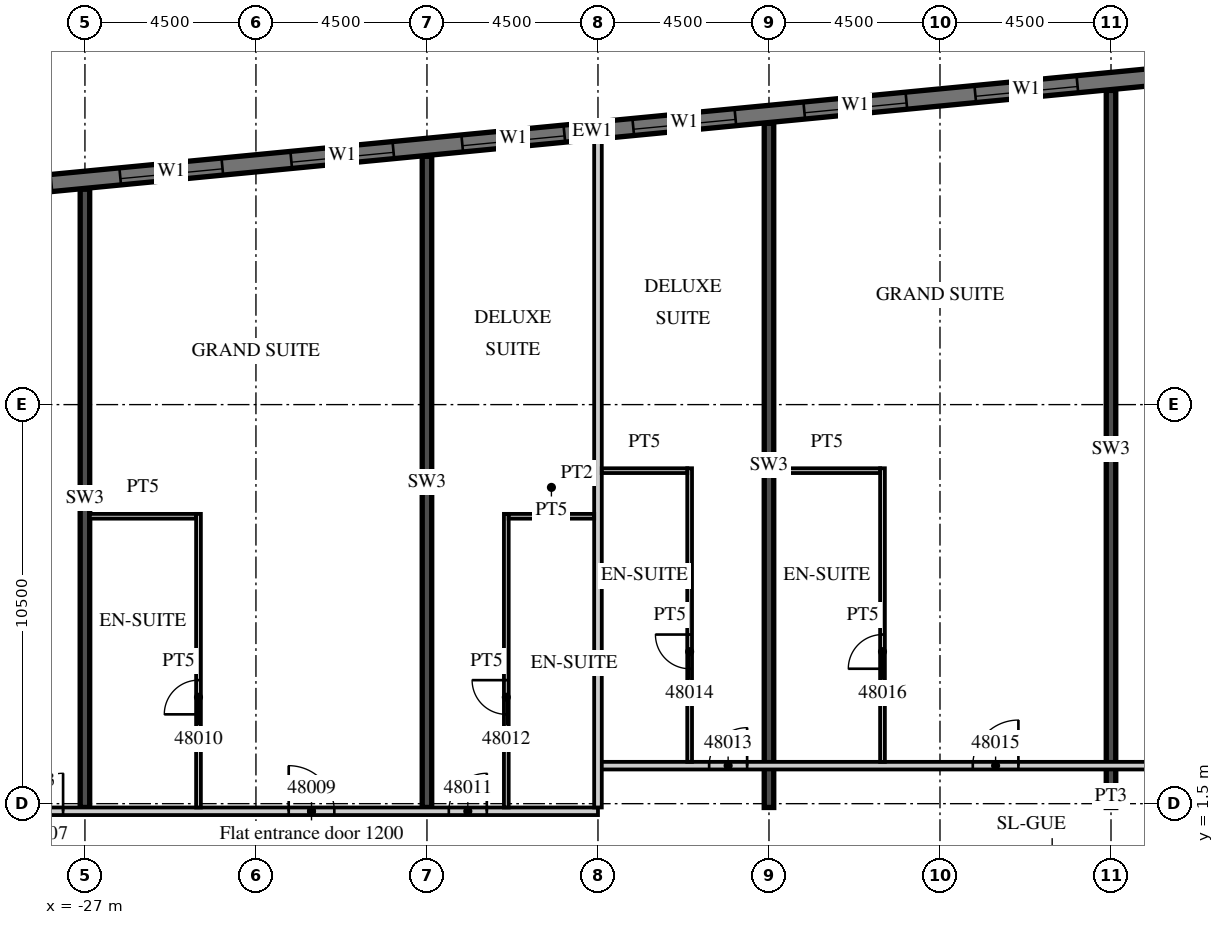
"""IFC4 building model, lengths in metres.
Left out: names, types, materials, properties, quantities, classifications, styles, units other than length and angle.
Written with IfcOpenShell. Run it as: python <this file> out.ifc"""

import sys

from ifc_helpers import new_model, si_unit, direction, frame, frame_2d, origin, place, context, subcontext, project, spatial, rectangle, extrude, element, fill, save


model = new_model("IFC4")
c1 = context("Model", 3, precision=1e-05, world=origin(), true_north=direction((0.0, 1.0)))
c2 = subcontext(c1, "Body", "Model", "MODEL_VIEW")
j1 = project(units=[si_unit("LENGTHUNIT", "METRE"), si_unit("PLANEANGLEUNIT", "RADIAN")], contexts=[c1])
p1 = place(None, origin())
s1 = spatial("IfcSite", under=j1, at=p1, CompositionType="ELEMENT")
p2 = place(p1, origin())
s2 = spatial("IfcBuilding", under=s1, at=p2, CompositionType="ELEMENT")
p3 = place(p2, frame((0.0, 0.0, 199.9)))
s3 = spatial("IfcBuildingStorey", under=s2, at=p3, CompositionType="ELEMENT", Elevation=199.9)
p4 = place(p3, frame((-27.0, 1.4, 0.0), z_axis=(0.0, 0.0, 1.0), x_axis=(0.0, 1.0, 0.0)))
e1 = element("IfcWall", 1, at=p4, inside=s3, PredefinedType="SHEAR", context=c2, shape_type="SweptSolid", body=[
    extrude(rectangle(XDim=16.268, YDim=0.25, at=frame_2d((8.134, 0.0))), origin(), (0.0, 0.0, 1.0), 3.3),
])
p5 = place(p3, frame((-18.0, 1.4, 0.0), z_axis=(0.0, 0.0, 1.0), x_axis=(0.0, 1.0, 0.0)))
e2 = element("IfcWall", 2, at=p5, inside=s3, PredefinedType="SHEAR", context=c2, shape_type="SweptSolid", body=[
    extrude(rectangle(XDim=17.134, YDim=0.25, at=frame_2d((8.567, 0.0))), origin(), (0.0, 0.0, 1.0), 3.3),
])
p6 = place(p3, frame((-9.0, 1.4, 0.0), z_axis=(0.0, 0.0, 1.0), x_axis=(0.0, 1.0, 0.0)))
e3 = element("IfcWall", 3, at=p6, inside=s3, PredefinedType="SHEAR", context=c2, shape_type="SweptSolid", body=[
    extrude(rectangle(XDim=18.001, YDim=0.25, at=frame_2d((9.0, 0.0))), origin(), (0.0, 0.0, 1.0), 3.3),
])
p7 = place(p3, frame((0.0, 1.4, 0.0), z_axis=(0.0, 0.0, 1.0), x_axis=(0.0, 1.0, 0.0)))
e4 = element("IfcWall", 4, at=p7, inside=s3, PredefinedType="SHEAR", context=c2, shape_type="SweptSolid", body=[
    extrude(rectangle(XDim=18.867, YDim=0.25, at=frame_2d((9.434, 0.0))), origin(), (0.0, 0.0, 1.0), 3.3),
])
p8 = place(p3, frame((13.521, 21.817, 0.0), z_axis=(0.0, 0.0, 1.0), x_axis=(-0.995396508751, -0.095842529008, 0.0)))
e5 = element("IfcWall", 5, at=p8, inside=s3, PredefinedType="SOLIDWALL", context=c2, shape_type="SweptSolid", body=[
    extrude(rectangle(XDim=54.591, YDim=0.45, at=frame_2d((27.296, 0.0))), origin(), (0.0, 0.0, 1.0), 3.02),
])
p9 = place(p8, frame((0.91, 0.0, 0.45)))
e6 = element("IfcOpeningElement", 6, at=p9, cuts=e5, PredefinedType="OPENING", context=c2, shape_type="SweptSolid", body=[
    extrude(rectangle(XDim=2.7, YDim=2.25, at=frame_2d((1.35, 1.125))), frame((0.0, 0.235, 0.0), z_axis=(0.0, -1.0, 0.0), x_axis=(1.0, 0.0, 0.0)), (0.0, 0.0, 1.0), 0.47),
])
p10 = place(p8, frame((5.431, 0.0, 0.45)))
e7 = element("IfcOpeningElement", 7, at=p10, cuts=e5, PredefinedType="OPENING", context=c2, shape_type="SweptSolid", body=[
    extrude(rectangle(XDim=2.7, YDim=2.25, at=frame_2d((1.35, 1.125))), frame((0.0, 0.235, 0.0), z_axis=(0.0, -1.0, 0.0), x_axis=(1.0, 0.0, 0.0)), (0.0, 0.0, 1.0), 0.47),
])
p11 = place(p8, frame((9.952, 0.0, 0.45)))
e8 = element("IfcOpeningElement", 8, at=p11, cuts=e5, PredefinedType="OPENING", context=c2, shape_type="SweptSolid", body=[
    extrude(rectangle(XDim=2.7, YDim=2.25, at=frame_2d((1.35, 1.125))), frame((0.0, 0.235, 0.0), z_axis=(0.0, -1.0, 0.0), x_axis=(1.0, 0.0, 0.0)), (0.0, 0.0, 1.0), 0.47),
])
p12 = place(p8, frame((14.473, 0.0, 0.45)))
e9 = element("IfcOpeningElement", 9, at=p12, cuts=e5, PredefinedType="OPENING", context=c2, shape_type="SweptSolid", body=[
    extrude(rectangle(XDim=2.7, YDim=2.25, at=frame_2d((1.35, 1.125))), frame((0.0, 0.235, 0.0), z_axis=(0.0, -1.0, 0.0), x_axis=(1.0, 0.0, 0.0)), (0.0, 0.0, 1.0), 0.47),
])
p13 = place(p8, frame((18.994, 0.0, 0.45)))
e10 = element("IfcOpeningElement", 10, at=p13, cuts=e5, PredefinedType="OPENING", context=c2, shape_type="SweptSolid", body=[
    extrude(rectangle(XDim=2.7, YDim=2.25, at=frame_2d((1.35, 1.125))), frame((0.0, 0.235, 0.0), z_axis=(0.0, -1.0, 0.0), x_axis=(1.0, 0.0, 0.0)), (0.0, 0.0, 1.0), 0.47),
])
p14 = place(p8, frame((23.514, 0.0, 0.45)))
e11 = element("IfcOpeningElement", 11, at=p14, cuts=e5, PredefinedType="OPENING", context=c2, shape_type="SweptSolid", body=[
    extrude(rectangle(XDim=2.7, YDim=2.25, at=frame_2d((1.35, 1.125))), frame((0.0, 0.235, 0.0), z_axis=(0.0, -1.0, 0.0), x_axis=(1.0, 0.0, 0.0)), (0.0, 0.0, 1.0), 0.47),
])
p15 = place(p8, frame((28.035, 0.0, 0.45)))
e12 = element("IfcOpeningElement", 12, at=p15, cuts=e5, PredefinedType="OPENING", context=c2, shape_type="SweptSolid", body=[
    extrude(rectangle(XDim=2.7, YDim=2.25, at=frame_2d((1.35, 1.125))), frame((0.0, 0.235, 0.0), z_axis=(0.0, -1.0, 0.0), x_axis=(1.0, 0.0, 0.0)), (0.0, 0.0, 1.0), 0.47),
])
p16 = place(p8, frame((32.556, 0.0, 0.45)))
e13 = element("IfcOpeningElement", 13, at=p16, cuts=e5, PredefinedType="OPENING", context=c2, shape_type="SweptSolid", body=[
    extrude(rectangle(XDim=2.7, YDim=2.25, at=frame_2d((1.35, 1.125))), frame((0.0, 0.235, 0.0), z_axis=(0.0, -1.0, 0.0), x_axis=(1.0, 0.0, 0.0)), (0.0, 0.0, 1.0), 0.47),
])
p17 = place(p8, frame((37.077, 0.0, 0.45)))
e14 = element("IfcOpeningElement", 14, at=p17, cuts=e5, PredefinedType="OPENING", context=c2, shape_type="SweptSolid", body=[
    extrude(rectangle(XDim=2.7, YDim=2.25, at=frame_2d((1.35, 1.125))), frame((0.0, 0.235, 0.0), z_axis=(0.0, -1.0, 0.0), x_axis=(1.0, 0.0, 0.0)), (0.0, 0.0, 1.0), 0.47),
])
p18 = place(p8, frame((41.598, 0.0, 0.45)))
e15 = element("IfcOpeningElement", 15, at=p18, cuts=e5, PredefinedType="OPENING", context=c2, shape_type="SweptSolid", body=[
    extrude(rectangle(XDim=2.7, YDim=2.25, at=frame_2d((1.35, 1.125))), frame((0.0, 0.235, 0.0), z_axis=(0.0, -1.0, 0.0), x_axis=(1.0, 0.0, 0.0)), (0.0, 0.0, 1.0), 0.47),
])
p19 = place(p8, frame((46.118, 0.0, 0.45)))
e16 = element("IfcOpeningElement", 16, at=p19, cuts=e5, PredefinedType="OPENING", context=c2, shape_type="SweptSolid", body=[
    extrude(rectangle(XDim=2.7, YDim=2.25, at=frame_2d((1.35, 1.125))), frame((0.0, 0.235, 0.0), z_axis=(0.0, -1.0, 0.0), x_axis=(1.0, 0.0, 0.0)), (0.0, 0.0, 1.0), 0.47),
])
p20 = place(p8, frame((50.629, 0.0, 0.45)))
e17 = element("IfcOpeningElement", 17, at=p20, cuts=e5, PredefinedType="OPENING", context=c2, shape_type="SweptSolid", body=[
    extrude(rectangle(XDim=2.7, YDim=2.25, at=frame_2d((1.35, 1.125))), frame((0.0, 0.235, 0.0), z_axis=(0.0, -1.0, 0.0), x_axis=(1.0, 0.0, 0.0)), (0.0, 0.0, 1.0), 0.47),
])
p21 = place(p3, frame((-42.913, 1.3, 0.0), z_axis=(0.0, 0.0, 1.0), x_axis=(1.0, 0.0, 0.0)))
e18 = element("IfcWall", 18, at=p21, inside=s3, PredefinedType="PARTITIONING", context=c2, shape_type="SweptSolid", body=[
    extrude(rectangle(XDim=29.413, YDim=0.2, at=frame_2d((14.707, 0.0))), origin(), (0.0, 0.0, 1.0), 3.02),
])
p22 = place(p21, frame((0.15, 0.0, 0.0)))
e19 = element("IfcOpeningElement", 19, at=p22, cuts=e18, PredefinedType="OPENING", context=c2, shape_type="SweptSolid", body=[
    extrude(rectangle(XDim=0.9, YDim=2.1, at=frame_2d((0.45, 1.05))), frame((0.0, 0.11, 0.0), z_axis=(0.0, -1.0, 0.0), x_axis=(1.0, 0.0, 0.0)), (0.0, 0.0, 1.0), 0.22),
])
p23 = place(p21, frame((2.963, 0.0, 0.0)))
e20 = element("IfcOpeningElement", 20, at=p23, cuts=e18, PredefinedType="OPENING", context=c2, shape_type="SweptSolid", body=[
    extrude(rectangle(XDim=1.0, YDim=2.1, at=frame_2d((0.5, 1.05))), frame((0.0, 0.11, 0.0), z_axis=(0.0, -1.0, 0.0), x_axis=(1.0, 0.0, 0.0)), (0.0, 0.0, 1.0), 0.22),
])
p24 = place(p21, frame((9.863, 0.0, 0.0)))
e21 = element("IfcOpeningElement", 21, at=p24, cuts=e18, PredefinedType="OPENING", context=c2, shape_type="SweptSolid", body=[
    extrude(rectangle(XDim=1.0, YDim=2.1, at=frame_2d((0.5, 1.05))), frame((0.0, 0.11, 0.0), z_axis=(0.0, -1.0, 0.0), x_axis=(1.0, 0.0, 0.0)), (0.0, 0.0, 1.0), 0.22),
])
p25 = place(p21, frame((14.338, 0.0, 0.0)))
e22 = element("IfcOpeningElement", 22, at=p25, cuts=e18, PredefinedType="OPENING", context=c2, shape_type="SweptSolid", body=[
    extrude(rectangle(XDim=1.0, YDim=2.1, at=frame_2d((0.5, 1.05))), frame((0.0, 0.11, 0.0), z_axis=(0.0, -1.0, 0.0), x_axis=(1.0, 0.0, 0.0)), (0.0, 0.0, 1.0), 0.22),
])
p26 = place(p21, frame((21.275, 0.0, 0.0)))
e23 = element("IfcOpeningElement", 23, at=p26, cuts=e18, PredefinedType="OPENING", context=c2, shape_type="SweptSolid", body=[
    extrude(rectangle(XDim=1.2, YDim=2.1, at=frame_2d((0.6, 1.05))), frame((0.0, 0.11, 0.0), z_axis=(0.0, -1.0, 0.0), x_axis=(1.0, 0.0, 0.0)), (0.0, 0.0, 1.0), 0.22),
])
p27 = place(p21, frame((25.488, 0.0, 0.0)))
e24 = element("IfcOpeningElement", 24, at=p27, cuts=e18, PredefinedType="OPENING", context=c2, shape_type="SweptSolid", body=[
    extrude(rectangle(XDim=1.0, YDim=2.1, at=frame_2d((0.5, 1.05))), frame((0.0, 0.11, 0.0), z_axis=(0.0, -1.0, 0.0), x_axis=(1.0, 0.0, 0.0)), (0.0, 0.0, 1.0), 0.22),
])
p28 = place(p3, frame((-13.5, 2.5, 0.0), z_axis=(0.0, 0.0, 1.0), x_axis=(1.0, 0.0, 0.0)))
e25 = element("IfcWall", 25, at=p28, inside=s3, PredefinedType="PARTITIONING", context=c2, shape_type="SweptSolid", body=[
    extrude(rectangle(XDim=27.0, YDim=0.2, at=frame_2d((13.5, 0.0))), origin(), (0.0, 0.0, 1.0), 3.02),
])
p29 = place(p28, frame((2.925, 0.0, 0.0)))
e26 = element("IfcOpeningElement", 26, at=p29, cuts=e25, PredefinedType="OPENING", context=c2, shape_type="SweptSolid", body=[
    extrude(rectangle(XDim=1.0, YDim=2.1, at=frame_2d((0.5, 1.05))), frame((0.0, 0.11, 0.0), z_axis=(0.0, -1.0, 0.0), x_axis=(1.0, 0.0, 0.0)), (0.0, 0.0, 1.0), 0.22),
])
p30 = place(p28, frame((9.863, 0.0, 0.0)))
e27 = element("IfcOpeningElement", 27, at=p30, cuts=e25, PredefinedType="OPENING", context=c2, shape_type="SweptSolid", body=[
    extrude(rectangle(XDim=1.2, YDim=2.1, at=frame_2d((0.6, 1.05))), frame((0.0, 0.11, 0.0), z_axis=(0.0, -1.0, 0.0), x_axis=(1.0, 0.0, 0.0)), (0.0, 0.0, 1.0), 0.22),
])
p31 = place(p28, frame((15.938, 0.0, 0.0)))
e28 = element("IfcOpeningElement", 28, at=p31, cuts=e25, PredefinedType="OPENING", context=c2, shape_type="SweptSolid", body=[
    extrude(rectangle(XDim=1.2, YDim=2.1, at=frame_2d((0.6, 1.05))), frame((0.0, 0.11, 0.0), z_axis=(0.0, -1.0, 0.0), x_axis=(1.0, 0.0, 0.0)), (0.0, 0.0, 1.0), 0.22),
])
p32 = place(p28, frame((23.075, 0.0, 0.0)))
e29 = element("IfcOpeningElement", 29, at=p32, cuts=e25, PredefinedType="OPENING", context=c2, shape_type="SweptSolid", body=[
    extrude(rectangle(XDim=1.0, YDim=2.1, at=frame_2d((0.5, 1.05))), frame((0.0, 0.11, 0.0), z_axis=(0.0, -1.0, 0.0), x_axis=(1.0, 0.0, 0.0)), (0.0, 0.0, 1.0), 0.22),
])
p33 = place(p3, frame((-24.012, 1.4, 0.0), z_axis=(0.0, 0.0, 1.0), x_axis=(0.0, 1.0, 0.0)))
e30 = element("IfcWall", 30, at=p33, inside=s3, PredefinedType="PARTITIONING", context=c2, shape_type="SweptSolid", body=[
    extrude(rectangle(XDim=7.725, YDim=0.125, at=frame_2d((3.863, 0.0))), origin(), (0.0, 0.0, 1.0), 3.02),
])
p34 = place(p33, frame((2.45, 0.0, 0.0)))
e31 = element("IfcOpeningElement", 31, at=p34, cuts=e30, PredefinedType="OPENING", context=c2, shape_type="SweptSolid", body=[
    extrude(rectangle(XDim=0.9, YDim=2.1, at=frame_2d((0.45, 1.05))), frame((0.0, 0.073, 0.0), z_axis=(0.0, -1.0, 0.0), x_axis=(1.0, 0.0, 0.0)), (0.0, 0.0, 1.0), 0.145),
])
p35 = place(p3, frame((-26.875, 9.062, 0.0), z_axis=(0.0, 0.0, 1.0), x_axis=(1.0, 0.0, 0.0)))
e32 = element("IfcWall", 32, at=p35, inside=s3, PredefinedType="PARTITIONING", context=c2, shape_type="SweptSolid", body=[
    extrude(rectangle(XDim=2.8, YDim=0.125, at=frame_2d((1.4, 0.0))), origin(), (0.0, 0.0, 1.0), 3.02),
])
p36 = place(p3, frame((-13.5, 1.4, 0.0), z_axis=(0.0, 0.0, 1.0), x_axis=(0.0, 1.0, 0.0)))
e33 = element("IfcWall", 33, at=p36, inside=s3, PredefinedType="PARTITIONING", context=c2, shape_type="SweptSolid", body=[
    extrude(rectangle(XDim=17.59, YDim=0.2, at=frame_2d((8.795, 0.0))), origin(), (0.0, 0.0, 1.0), 3.02),
])
p37 = place(p3, frame((-15.912, 1.4, 0.0), z_axis=(0.0, 0.0, 1.0), x_axis=(0.0, 1.0, 0.0)))
e34 = element("IfcWall", 34, at=p37, inside=s3, PredefinedType="PARTITIONING", context=c2, shape_type="SweptSolid", body=[
    extrude(rectangle(XDim=7.725, YDim=0.125, at=frame_2d((3.863, 0.0))), origin(), (0.0, 0.0, 1.0), 3.02),
])
p38 = place(p37, frame((2.45, 0.0, 0.0)))
e35 = element("IfcOpeningElement", 35, at=p38, cuts=e34, PredefinedType="OPENING", context=c2, shape_type="SweptSolid", body=[
    extrude(rectangle(XDim=0.9, YDim=2.1, at=frame_2d((0.45, 1.05))), frame((0.0, 0.073, 0.0), z_axis=(0.0, -1.0, 0.0), x_axis=(1.0, 0.0, 0.0)), (0.0, 0.0, 1.0), 0.145),
])
p39 = place(p3, frame((-15.85, 9.062, 0.0), z_axis=(0.0, 0.0, 1.0), x_axis=(1.0, 0.0, 0.0)))
e36 = element("IfcWall", 36, at=p39, inside=s3, PredefinedType="PARTITIONING", context=c2, shape_type="SweptSolid", body=[
    extrude(rectangle(XDim=2.25, YDim=0.125, at=frame_2d((1.125, 0.0))), origin(), (0.0, 0.0, 1.0), 3.02),
])
p40 = place(p3, frame((-11.088, 2.6, 0.0), z_axis=(0.0, 0.0, 1.0), x_axis=(0.0, 1.0, 0.0)))
e37 = element("IfcWall", 37, at=p40, inside=s3, PredefinedType="PARTITIONING", context=c2, shape_type="SweptSolid", body=[
    extrude(rectangle(XDim=7.725, YDim=0.125, at=frame_2d((3.862, 0.0))), origin(), (0.0, 0.0, 1.0), 3.02),
])
p41 = place(p40, frame((2.45, 0.0, 0.0)))
e38 = element("IfcOpeningElement", 38, at=p41, cuts=e37, PredefinedType="OPENING", context=c2, shape_type="SweptSolid", body=[
    extrude(rectangle(XDim=0.9, YDim=2.1, at=frame_2d((0.45, 1.05))), frame((0.0, 0.073, 0.0), z_axis=(0.0, -1.0, 0.0), x_axis=(1.0, 0.0, 0.0)), (0.0, 0.0, 1.0), 0.145),
])
p42 = place(p3, frame((-13.4, 10.262, 0.0), z_axis=(0.0, 0.0, 1.0), x_axis=(1.0, 0.0, 0.0)))
e39 = element("IfcWall", 39, at=p42, inside=s3, PredefinedType="PARTITIONING", context=c2, shape_type="SweptSolid", body=[
    extrude(rectangle(XDim=2.25, YDim=0.125, at=frame_2d((1.125, 0.0))), origin(), (0.0, 0.0, 1.0), 3.02),
])
p43 = place(p3, frame((-6.013, 2.6, 0.0), z_axis=(0.0, 0.0, 1.0), x_axis=(0.0, 1.0, 0.0)))
e40 = element("IfcWall", 40, at=p43, inside=s3, PredefinedType="PARTITIONING", context=c2, shape_type="SweptSolid", body=[
    extrude(rectangle(XDim=7.725, YDim=0.125, at=frame_2d((3.862, 0.0))), origin(), (0.0, 0.0, 1.0), 3.02),
])
p44 = place(p43, frame((2.45, 0.0, 0.0)))
e41 = element("IfcOpeningElement", 41, at=p44, cuts=e40, PredefinedType="OPENING", context=c2, shape_type="SweptSolid", body=[
    extrude(rectangle(XDim=0.9, YDim=2.1, at=frame_2d((0.45, 1.05))), frame((0.0, 0.073, 0.0), z_axis=(0.0, -1.0, 0.0), x_axis=(1.0, 0.0, 0.0)), (0.0, 0.0, 1.0), 0.145),
])
p45 = place(p3, frame((-8.875, 10.262, 0.0), z_axis=(0.0, 0.0, 1.0), x_axis=(1.0, 0.0, 0.0)))
e42 = element("IfcWall", 42, at=p45, inside=s3, PredefinedType="PARTITIONING", context=c2, shape_type="SweptSolid", body=[
    extrude(rectangle(XDim=2.8, YDim=0.125, at=frame_2d((1.4, 0.0))), origin(), (0.0, 0.0, 1.0), 3.02),
])
p46 = place(p12, origin())
e43 = element("IfcWindow", 43, at=p46, inside=s3, PartitioningType="SINGLE_PANEL", PredefinedType="WINDOW", context=c2, shape_type="SweptSolid", body=[
    extrude(rectangle(XDim=2.7, YDim=2.25, at=frame_2d((1.35, 1.125))), frame((0.0, 0.09, 0.0), z_axis=(0.0, -1.0, 0.0), x_axis=(1.0, 0.0, 0.0)), (0.0, 0.0, 1.0), 0.06),
])
fill(e9, e43)
p47 = place(p13, origin())
e44 = element("IfcWindow", 44, at=p47, inside=s3, PartitioningType="SINGLE_PANEL", PredefinedType="WINDOW", context=c2, shape_type="SweptSolid", body=[
    extrude(rectangle(XDim=2.7, YDim=2.25, at=frame_2d((1.35, 1.125))), frame((0.0, 0.09, 0.0), z_axis=(0.0, -1.0, 0.0), x_axis=(1.0, 0.0, 0.0)), (0.0, 0.0, 1.0), 0.06),
])
fill(e10, e44)
p48 = place(p14, origin())
e45 = element("IfcWindow", 45, at=p48, inside=s3, PartitioningType="SINGLE_PANEL", PredefinedType="WINDOW", context=c2, shape_type="SweptSolid", body=[
    extrude(rectangle(XDim=2.7, YDim=2.25, at=frame_2d((1.35, 1.125))), frame((0.0, 0.09, 0.0), z_axis=(0.0, -1.0, 0.0), x_axis=(1.0, 0.0, 0.0)), (0.0, 0.0, 1.0), 0.06),
])
fill(e11, e45)
p49 = place(p15, origin())
e46 = element("IfcWindow", 46, at=p49, inside=s3, PartitioningType="SINGLE_PANEL", PredefinedType="WINDOW", context=c2, shape_type="SweptSolid", body=[
    extrude(rectangle(XDim=2.7, YDim=2.25, at=frame_2d((1.35, 1.125))), frame((0.0, 0.09, 0.0), z_axis=(0.0, -1.0, 0.0), x_axis=(1.0, 0.0, 0.0)), (0.0, 0.0, 1.0), 0.06),
])
fill(e12, e46)
p50 = place(p16, origin())
e47 = element("IfcWindow", 47, at=p50, inside=s3, PartitioningType="SINGLE_PANEL", PredefinedType="WINDOW", context=c2, shape_type="SweptSolid", body=[
    extrude(rectangle(XDim=2.7, YDim=2.25, at=frame_2d((1.35, 1.125))), frame((0.0, 0.09, 0.0), z_axis=(0.0, -1.0, 0.0), x_axis=(1.0, 0.0, 0.0)), (0.0, 0.0, 1.0), 0.06),
])
fill(e13, e47)
p51 = place(p17, origin())
e48 = element("IfcWindow", 48, at=p51, inside=s3, PartitioningType="SINGLE_PANEL", PredefinedType="WINDOW", context=c2, shape_type="SweptSolid", body=[
    extrude(rectangle(XDim=2.7, YDim=2.25, at=frame_2d((1.35, 1.125))), frame((0.0, 0.09, 0.0), z_axis=(0.0, -1.0, 0.0), x_axis=(1.0, 0.0, 0.0)), (0.0, 0.0, 1.0), 0.06),
])
fill(e14, e48)
p52 = place(p25, origin())
e49 = element("IfcDoor", 49, at=p52, inside=s3, OperationType="SINGLE_SWING_RIGHT", PredefinedType="DOOR", context=c2, shape_type="SweptSolid", body=[
    extrude(rectangle(XDim=1.0, YDim=2.1, at=frame_2d((0.5, 1.05))), frame((0.0, 0.025, 0.0), z_axis=(0.0, -1.0, 0.0), x_axis=(1.0, 0.0, 0.0)), (0.0, 0.0, 1.0), 0.05),
])
fill(e22, e49)
p53 = place(p26, origin())
e50 = element("IfcDoor", 50, at=p53, inside=s3, OperationType="SINGLE_SWING_LEFT", PredefinedType="DOOR", context=c2, shape_type="SweptSolid", body=[
    extrude(rectangle(XDim=1.2, YDim=2.1, at=frame_2d((0.6, 1.05))), frame((0.0, 0.025, 0.0), z_axis=(0.0, -1.0, 0.0), x_axis=(1.0, 0.0, 0.0)), (0.0, 0.0, 1.0), 0.05),
])
fill(e23, e50)
p54 = place(p34, origin())
e51 = element("IfcDoor", 51, at=p54, inside=s3, OperationType="SINGLE_SWING_LEFT", PredefinedType="DOOR", context=c2, shape_type="SweptSolid", body=[
    extrude(rectangle(XDim=0.9, YDim=2.1, at=frame_2d((0.45, 1.05))), frame((0.0, 0.025, 0.0), z_axis=(0.0, -1.0, 0.0), x_axis=(1.0, 0.0, 0.0)), (0.0, 0.0, 1.0), 0.05),
])
fill(e31, e51)
p55 = place(p27, origin())
e52 = element("IfcDoor", 52, at=p55, inside=s3, OperationType="SINGLE_SWING_RIGHT", PredefinedType="DOOR", context=c2, shape_type="SweptSolid", body=[
    extrude(rectangle(XDim=1.0, YDim=2.1, at=frame_2d((0.5, 1.05))), frame((0.0, 0.025, 0.0), z_axis=(0.0, -1.0, 0.0), x_axis=(1.0, 0.0, 0.0)), (0.0, 0.0, 1.0), 0.05),
])
fill(e24, e52)
p56 = place(p38, origin())
e53 = element("IfcDoor", 53, at=p56, inside=s3, OperationType="SINGLE_SWING_RIGHT", PredefinedType="DOOR", context=c2, shape_type="SweptSolid", body=[
    extrude(rectangle(XDim=0.9, YDim=2.1, at=frame_2d((0.45, 1.05))), frame((0.0, 0.025, 0.0), z_axis=(0.0, -1.0, 0.0), x_axis=(1.0, 0.0, 0.0)), (0.0, 0.0, 1.0), 0.05),
])
fill(e35, e53)
p57 = place(p29, origin())
e54 = element("IfcDoor", 54, at=p57, inside=s3, OperationType="SINGLE_SWING_RIGHT", PredefinedType="DOOR", context=c2, shape_type="SweptSolid", body=[
    extrude(rectangle(XDim=1.0, YDim=2.1, at=frame_2d((0.5, 1.05))), frame((0.0, 0.025, 0.0), z_axis=(0.0, -1.0, 0.0), x_axis=(1.0, 0.0, 0.0)), (0.0, 0.0, 1.0), 0.05),
])
fill(e26, e54)
p58 = place(p41, origin())
e55 = element("IfcDoor", 55, at=p58, inside=s3, OperationType="SINGLE_SWING_RIGHT", PredefinedType="DOOR", context=c2, shape_type="SweptSolid", body=[
    extrude(rectangle(XDim=0.9, YDim=2.1, at=frame_2d((0.45, 1.05))), frame((0.0, 0.025, 0.0), z_axis=(0.0, -1.0, 0.0), x_axis=(1.0, 0.0, 0.0)), (0.0, 0.0, 1.0), 0.05),
])
fill(e38, e55)
p59 = place(p30, origin())
e56 = element("IfcDoor", 56, at=p59, inside=s3, OperationType="SINGLE_SWING_RIGHT", PredefinedType="DOOR", context=c2, shape_type="SweptSolid", body=[
    extrude(rectangle(XDim=1.2, YDim=2.1, at=frame_2d((0.6, 1.05))), frame((0.0, 0.025, 0.0), z_axis=(0.0, -1.0, 0.0), x_axis=(1.0, 0.0, 0.0)), (0.0, 0.0, 1.0), 0.05),
])
fill(e27, e56)
p60 = place(p44, origin())
e57 = element("IfcDoor", 57, at=p60, inside=s3, OperationType="SINGLE_SWING_LEFT", PredefinedType="DOOR", context=c2, shape_type="SweptSolid", body=[
    extrude(rectangle(XDim=0.9, YDim=2.1, at=frame_2d((0.45, 1.05))), frame((0.0, 0.025, 0.0), z_axis=(0.0, -1.0, 0.0), x_axis=(1.0, 0.0, 0.0)), (0.0, 0.0, 1.0), 0.05),
])
fill(e41, e57)
save(model, sys.argv[1])
